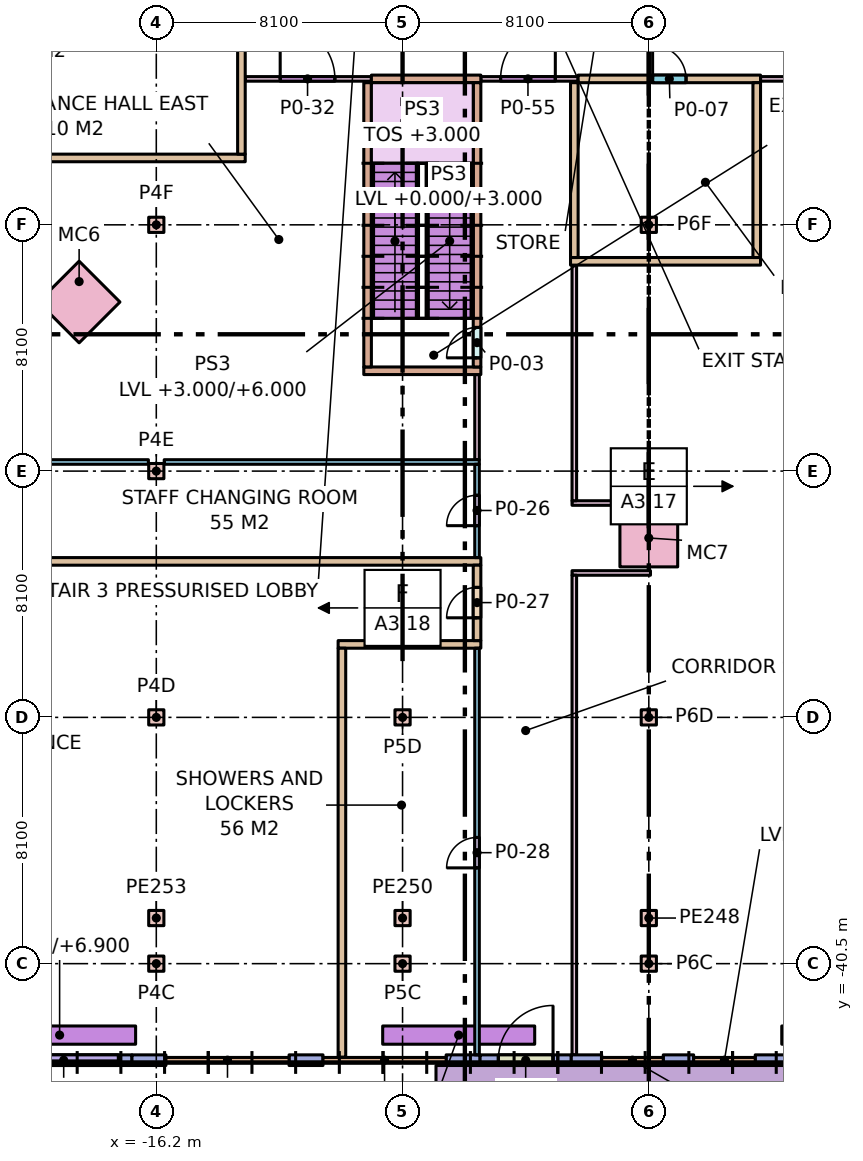
"""IFC4 building model, lengths in metres.
Left out: names, types, materials, properties, quantities, classifications, styles, units other than length and angle.
Written with IfcOpenShell. Run it as: python <this file> out.ifc"""

import sys

from ifc_helpers import new_model, si_unit, direction, frame, frame_2d, origin, origin_2d, place, context, subcontext, project, spatial, rectangle, extrude, element, fill, save


model = new_model("IFC4")
c1 = context("Model", 3, precision=1e-05, world=origin(), true_north=direction((0.0, 1.0)))
c2 = subcontext(c1, "Body", "Model", "MODEL_VIEW")
j1 = project(units=[si_unit("LENGTHUNIT", "METRE"), si_unit("PLANEANGLEUNIT", "RADIAN")], contexts=[c1])
p1 = place(None, origin())
s1 = spatial("IfcSite", under=j1, at=p1, CompositionType="ELEMENT")
p2 = place(p1, origin())
s2 = spatial("IfcBuilding", under=s1, at=p2, CompositionType="ELEMENT")
p3 = place(p2, origin())
s3 = spatial("IfcBuildingStorey", under=s2, at=p3, CompositionType="ELEMENT", Elevation=0.0)
for number, where, z_axis, x_axis in (
    (1, (-16.2, -40.5, 0.0), (0.0, 0.0, 1.0), (1.0, 0.0, 0.0)),
    (2, (-16.2, -32.4, 0.0), (0.0, 0.0, 1.0), (1.0, 0.0, 0.0)),
    (3, (-16.2, -24.3, 0.0), (0.0, 0.0, 1.0), (1.0, 0.0, 0.0)),
    (4, (-16.2, -16.2, 0.0), (0.0, 0.0, 1.0), (1.0, 0.0, 0.0)),
    (5, (-8.1, -40.5, 0.0), (0.0, 0.0, 1.0), (1.0, 0.0, 0.0)),
    (6, (-8.1, -32.4, 0.0), (0.0, 0.0, 1.0), (1.0, 0.0, 0.0)),
    (7, (0.0, -40.5, 0.0), (0.0, 0.0, 1.0), (1.0, 0.0, 0.0)),
    (8, (0.0, -32.4, 0.0), (0.0, 0.0, 1.0), (1.0, 0.0, 0.0)),
    (9, (0.0, -16.2, 0.0), (0.0, 0.0, 1.0), (1.0, 0.0, 0.0)),
    (10, (0.0, -39.0, 0.0), (0.0, 0.0, 1.0), (1.0, 0.0, 0.0)),
    (11, (-8.1, -39.0, 0.0), (0.0, 0.0, 1.0), (1.0, 0.0, 0.0)),
    (12, (-16.2, -39.0, 0.0), (0.0, 0.0, 1.0), (1.0, 0.0, 0.0)),
):
    element("IfcColumn", number, at=place(p3, frame(where, z_axis=z_axis, x_axis=x_axis)), inside=s3, PredefinedType="COLUMN", context=c2, shape_type="SweptSolid", body=[
        extrude(rectangle(XDim=0.5, YDim=0.5, at=origin_2d()), origin(), (0.0, 0.0, 1.0), 6.0),
    ])
for number, where, z_axis, x_axis in (
    (13, (-18.738, -18.738, 0.0), (0.0, 0.0, 1.0), (0.707, -0.707, 0.0)),
    (14, (0.0, -26.5, 0.0), (0.0, 0.0, 1.0), (1.0, 0.0, 0.0)),
):
    element("IfcColumn", number, at=place(p3, frame(where, z_axis=z_axis, x_axis=x_axis)), inside=s3, PredefinedType="COLUMN", context=c2, shape_type="SweptSolid", body=[
        extrude(rectangle(XDim=1.9, YDim=1.9, at=origin_2d()), origin(), (0.0, 0.0, 1.0), 6.0),
    ])
p4 = place(p3, frame((-21.492, -43.675, 0.0), z_axis=(0.0, 0.0, 1.0), x_axis=(1.0, 0.0, 0.0)))
e15 = element("IfcWall", 15, at=p4, inside=s3, PredefinedType="STANDARD", context=c2, shape_type="SweptSolid", body=[
    extrude(rectangle(XDim=4.492, YDim=0.35, at=frame_2d((2.246, 0.0))), origin(), (0.0, 0.0, 1.0), 5.68),
])
p5 = place(p4, frame((0.446, 0.0, 1.0)))
e16 = element("IfcOpeningElement", 16, at=p5, cuts=e15, PredefinedType="OPENING", context=c2, shape_type="SweptSolid", body=[
    extrude(rectangle(XDim=3.6, YDim=4.0, at=frame_2d((1.8, 2.0))), frame((0.0, 0.185, 0.0), z_axis=(0.0, -1.0, 0.0), x_axis=(1.0, 0.0, 0.0)), (0.0, 0.0, 1.0), 0.37),
])
p6 = place(p3, frame((-17.0, -43.675, 0.0), z_axis=(0.0, 0.0, 1.0), x_axis=(1.0, 0.0, 0.0)))
e17 = element("IfcWall", 17, at=p6, inside=s3, PredefinedType="STANDARD", context=c2, shape_type="SweptSolid", body=[
    extrude(rectangle(XDim=1.117, YDim=0.35, at=frame_2d((0.558, 0.0))), origin(), (0.0, 0.0, 1.0), 5.68),
])
p7 = place(p3, frame((-11.833, -43.675, 0.0), z_axis=(0.0, 0.0, 1.0), x_axis=(1.0, 0.0, 0.0)))
e18 = element("IfcWall", 18, at=p7, inside=s3, PredefinedType="STANDARD", context=c2, shape_type="SweptSolid", body=[
    extrude(rectangle(XDim=1.116, YDim=0.35, at=frame_2d((0.558, 0.0))), origin(), (0.0, 0.0, 1.0), 5.68),
])
p8 = place(p3, frame((-6.667, -43.675, 0.0), z_axis=(0.0, 0.0, 1.0), x_axis=(1.0, 0.0, 0.0)))
e19 = element("IfcWall", 19, at=p8, inside=s3, PredefinedType="STANDARD", context=c2, shape_type="SweptSolid", body=[
    extrude(rectangle(XDim=1.117, YDim=0.35, at=frame_2d((0.558, 0.0))), origin(), (0.0, 0.0, 1.0), 5.68),
])
p9 = place(p3, frame((-5.55, -43.675, 0.0), z_axis=(0.0, 0.0, 1.0), x_axis=(1.0, 0.0, 0.0)))
e20 = element("IfcWall", 20, at=p9, inside=s3, PredefinedType="STANDARD", context=c2, shape_type="SweptSolid", body=[
    extrude(rectangle(XDim=3.0, YDim=0.35, at=frame_2d((1.5, 0.0))), origin(), (0.0, 0.0, 1.0), 5.68),
])
p10 = place(p9, frame((0.6, 0.0, 0.0)))
e21 = element("IfcOpeningElement", 21, at=p10, cuts=e20, PredefinedType="OPENING", context=c2, shape_type="SweptSolid", body=[
    extrude(rectangle(XDim=1.8, YDim=2.4, at=frame_2d((0.9, 1.2))), frame((0.0, 0.185, 0.0), z_axis=(0.0, -1.0, 0.0), x_axis=(1.0, 0.0, 0.0)), (0.0, 0.0, 1.0), 0.37),
])
for number, where, z_axis, x_axis in (
    (22, (-2.55, -43.675, 0.0), (0.0, 0.0, 1.0), (1.0, 0.0, 0.0)),
    (23, (0.475, -43.675, 0.0), (0.0, 0.0, 1.0), (1.0, 0.0, 0.0)),
    (24, (3.5, -43.675, 0.0), (0.0, 0.0, 1.0), (1.0, 0.0, 0.0)),
):
    element("IfcWall", number, at=place(p3, frame(where, z_axis=z_axis, x_axis=x_axis)), inside=s3, PredefinedType="STANDARD", context=c2, shape_type="SweptSolid", body=[
        extrude(rectangle(XDim=1.0, YDim=0.35, at=frame_2d((0.5, 0.0))), origin(), (0.0, 0.0, 1.0), 5.68),
    ])
for number, where, z_axis, x_axis in (
    (25, (-21.88, -42.85, 6.0), (0.0, 0.0, 1.0), (1.0, 0.0, 0.0)),
    (26, (-8.753, -42.85, 6.0), (0.0, 0.0, 1.0), (1.0, 0.0, 0.0)),
    (27, (4.373, -42.85, 6.0), (0.0, 0.0, 1.0), (1.0, 0.0, 0.0)),
):
    element("IfcWall", number, at=place(p3, frame(where, z_axis=z_axis, x_axis=x_axis)), inside=s3, PredefinedType="PARAPET", context=c2, shape_type="SweptSolid", body=[
        extrude(rectangle(XDim=5.0, YDim=0.6, at=frame_2d((2.5, 0.0))), origin(), (0.0, 0.0, 1.0), 0.9),
    ])
p11 = place(p3, frame((-24.125, -27.27, 0.0), z_axis=(0.0, 0.0, 1.0), x_axis=(1.0, 0.0, 0.0)))
e28 = element("IfcWall", 28, at=p11, inside=s3, PredefinedType="PARTITIONING", context=c2, shape_type="SweptSolid", body=[
    extrude(rectangle(XDim=18.6, YDim=0.25, at=frame_2d((9.3, 0.0))), origin(), (0.0, 0.0, 1.0), 5.68),
])
p12 = place(p3, frame((-23.875, -24.0, 0.0), z_axis=(0.0, 0.0, 1.0), x_axis=(1.0, 0.0, 0.0)))
e29 = element("IfcWall", 29, at=p12, inside=s3, PredefinedType="PARTITIONING", context=c2, shape_type="SweptSolid", body=[
    extrude(rectangle(XDim=7.415, YDim=0.15, at=frame_2d((3.708, 0.0))), origin(), (0.0, 0.0, 1.0), 5.68),
])
p13 = place(p3, frame((-15.94, -24.0, 0.0), z_axis=(0.0, 0.0, 1.0), x_axis=(1.0, 0.0, 0.0)))
e30 = element("IfcWall", 30, at=p13, inside=s3, PredefinedType="PARTITIONING", context=c2, shape_type="SweptSolid", body=[
    extrude(rectangle(XDim=10.365, YDim=0.15, at=frame_2d((5.183, 0.0))), origin(), (0.0, 0.0, 1.0), 5.68),
])
p14 = place(p3, frame((-5.65, -27.145, 0.0), z_axis=(0.0, 0.0, 1.0), x_axis=(0.0, 1.0, 0.0)))
e31 = element("IfcWall", 31, at=p14, inside=s3, PredefinedType="PARTITIONING", context=c2, shape_type="SweptSolid", body=[
    extrude(rectangle(XDim=3.07, YDim=0.15, at=frame_2d((1.535, 0.0))), origin(), (0.0, 0.0, 1.0), 5.68),
])
p15 = place(p14, frame((1.05, 0.0, 0.0)))
e32 = element("IfcOpeningElement", 32, at=p15, cuts=e31, PredefinedType="OPENING", context=c2, shape_type="SweptSolid", body=[
    extrude(rectangle(XDim=1.0, YDim=2.1, at=frame_2d((0.5, 1.05))), frame((0.0, 0.085, 0.0), z_axis=(0.0, -1.0, 0.0), x_axis=(1.0, 0.0, 0.0)), (0.0, 0.0, 1.0), 0.17),
])
p16 = place(p3, frame((-37.5, -14.0, 0.0), z_axis=(0.0, 0.0, 1.0), x_axis=(1.0, 0.0, 0.0)))
e33 = element("IfcWall", 33, at=p16, inside=s3, PredefinedType="PARTITIONING", context=c2, shape_type="SweptSolid", body=[
    extrude(rectangle(XDim=24.225, YDim=0.25, at=frame_2d((12.113, 0.0))), origin(), (0.0, 0.0, 1.0), 5.68),
])
p17 = place(p3, frame((-10.219, -30.0, 0.0), z_axis=(0.0, 0.0, 1.0), x_axis=(1.0, 0.0, 0.0)))
e34 = element("IfcWall", 34, at=p17, inside=s3, PredefinedType="PARTITIONING", context=c2, shape_type="SweptSolid", body=[
    extrude(rectangle(XDim=4.695, YDim=0.25, at=frame_2d((2.347, 0.0))), origin(), (0.0, 0.0, 1.0), 5.68),
])
p18 = place(p3, frame((-10.094, -43.575, 0.0), z_axis=(0.0, 0.0, 1.0), x_axis=(0.0, 1.0, 0.0)))
e35 = element("IfcWall", 35, at=p18, inside=s3, PredefinedType="PARTITIONING", context=c2, shape_type="SweptSolid", body=[
    extrude(rectangle(XDim=13.45, YDim=0.25, at=frame_2d((6.725, 0.0))), origin(), (0.0, 0.0, 1.0), 5.68),
])
p19 = place(p3, frame((-5.65, -29.875, 0.0), z_axis=(0.0, 0.0, 1.0), x_axis=(0.0, 1.0, 0.0)))
e36 = element("IfcWall", 36, at=p19, inside=s3, PredefinedType="PARTITIONING", context=c2, shape_type="SweptSolid", body=[
    extrude(rectangle(XDim=2.48, YDim=0.25, at=frame_2d((1.24, 0.0))), origin(), (0.0, 0.0, 1.0), 5.68),
])
p20 = place(p19, frame((0.75, 0.0, 0.0)))
e37 = element("IfcOpeningElement", 37, at=p20, cuts=e36, PredefinedType="OPENING", context=c2, shape_type="SweptSolid", body=[
    extrude(rectangle(XDim=1.0, YDim=2.1, at=frame_2d((0.5, 1.05))), frame((0.0, 0.135, 0.0), z_axis=(0.0, -1.0, 0.0), x_axis=(1.0, 0.0, 0.0)), (0.0, 0.0, 1.0), 0.27),
])
p21 = place(p3, frame((-2.325, -11.4, 0.0), z_axis=(0.0, 0.0, 1.0), x_axis=(1.0, 0.0, 0.0)))
e38 = element("IfcWall", 38, at=p21, inside=s3, PredefinedType="PARTITIONING", context=c2, shape_type="SweptSolid", body=[
    extrude(rectangle(XDim=6.0, YDim=0.25, at=frame_2d((3.0, 0.0))), origin(), (0.0, 0.0, 1.0), 5.68),
])
p22 = place(p21, frame((2.45, 0.0, 0.0)))
e39 = element("IfcOpeningElement", 39, at=p22, cuts=e38, PredefinedType="OPENING", context=c2, shape_type="SweptSolid", body=[
    extrude(rectangle(XDim=1.1, YDim=2.1, at=frame_2d((0.55, 1.05))), frame((0.0, 0.135, 0.0), z_axis=(0.0, -1.0, 0.0), x_axis=(1.0, 0.0, 0.0)), (0.0, 0.0, 1.0), 0.27),
])
p23 = place(p3, frame((-2.575, -17.4, 0.0), z_axis=(0.0, 0.0, 1.0), x_axis=(1.0, 0.0, 0.0)))
e40 = element("IfcWall", 40, at=p23, inside=s3, PredefinedType="PARTITIONING", context=c2, shape_type="SweptSolid", body=[
    extrude(rectangle(XDim=6.25, YDim=0.25, at=frame_2d((3.125, 0.0))), origin(), (0.0, 0.0, 1.0), 5.68),
])
for number, where, z_axis, x_axis in (
    (41, (3.55, -17.275, 0.0), (0.0, 0.0, 1.0), (0.0, 1.0, 0.0)),
    (42, (-2.45, -17.275, 0.0), (0.0, 0.0, 1.0), (0.0, 1.0, 0.0)),
):
    element("IfcWall", number, at=place(p3, frame(where, z_axis=z_axis, x_axis=x_axis)), inside=s3, PredefinedType="PARTITIONING", context=c2, shape_type="SweptSolid", body=[
        extrude(rectangle(XDim=5.75, YDim=0.25, at=frame_2d((2.875, 0.0))), origin(), (0.0, 0.0, 1.0), 5.68),
    ])
p24 = place(p3, frame((-9.125, -11.4, 0.0), z_axis=(0.0, 0.0, 1.0), x_axis=(1.0, 0.0, 0.0)))
e43 = element("IfcWall", 43, at=p24, inside=s3, PredefinedType="STANDARD", context=c2, shape_type="SweptSolid", body=[
    extrude(rectangle(XDim=3.6, YDim=0.25, at=frame_2d((1.8, 0.0))), origin(), (0.0, 0.0, 1.0), 5.68),
])
p25 = place(p3, frame((-9.375, -21.0, 0.0), z_axis=(0.0, 0.0, 1.0), x_axis=(1.0, 0.0, 0.0)))
e44 = element("IfcWall", 44, at=p25, inside=s3, PredefinedType="STANDARD", context=c2, shape_type="SweptSolid", body=[
    extrude(rectangle(XDim=3.85, YDim=0.25, at=frame_2d((1.925, 0.0))), origin(), (0.0, 0.0, 1.0), 5.68),
])
p26 = place(p3, frame((-9.25, -20.875, 0.0), z_axis=(0.0, 0.0, 1.0), x_axis=(0.0, 1.0, 0.0)))
e45 = element("IfcWall", 45, at=p26, inside=s3, PredefinedType="STANDARD", context=c2, shape_type="SweptSolid", body=[
    extrude(rectangle(XDim=9.35, YDim=0.25, at=frame_2d((4.675, 0.0))), origin(), (0.0, 0.0, 1.0), 5.68),
])
p27 = place(p3, frame((-5.65, -20.875, 0.0), z_axis=(0.0, 0.0, 1.0), x_axis=(0.0, 1.0, 0.0)))
e46 = element("IfcWall", 46, at=p27, inside=s3, PredefinedType="STANDARD", context=c2, shape_type="SweptSolid", body=[
    extrude(rectangle(XDim=9.35, YDim=0.25, at=frame_2d((4.675, 0.0))), origin(), (0.0, 0.0, 1.0), 5.68),
])
p28 = place(p27, frame((0.3, 0.0, 0.0)))
e47 = element("IfcOpeningElement", 47, at=p28, cuts=e46, PredefinedType="OPENING", context=c2, shape_type="SweptSolid", body=[
    extrude(rectangle(XDim=1.0, YDim=2.1, at=frame_2d((0.5, 1.05))), frame((0.0, 0.135, 0.0), z_axis=(0.0, -1.0, 0.0), x_axis=(1.0, 0.0, 0.0)), (0.0, 0.0, 1.0), 0.27),
])
p29 = place(p3, frame((-13.4, -13.875, 0.0), z_axis=(0.0, 0.0, 1.0), x_axis=(0.0, 1.0, 0.0)))
e48 = element("IfcWall", 48, at=p29, inside=s3, PredefinedType="PARTITIONING", context=c2, shape_type="SweptSolid", body=[
    extrude(rectangle(XDim=8.1, YDim=0.25, at=frame_2d((4.05, 0.0))), origin(), (0.0, 0.0, 1.0), 5.68),
])
p30 = place(p3, frame((-13.275, -11.4, 0.0), z_axis=(0.0, 0.0, 1.0), x_axis=(1.0, 0.0, 0.0)))
e49 = element("IfcWall", 49, at=p30, inside=s3, PredefinedType="PARTITIONING", context=c2, shape_type="SweptSolid", body=[
    extrude(rectangle(XDim=4.15, YDim=0.15, at=frame_2d((2.075, 0.0))), origin(), (0.0, 0.0, 1.0), 5.68),
])
p31 = place(p30, frame((1.15, 0.0, 0.0)))
e50 = element("IfcOpeningElement", 50, at=p31, cuts=e49, PredefinedType="OPENING", context=c2, shape_type="SweptSolid", body=[
    extrude(rectangle(XDim=1.8, YDim=2.4, at=frame_2d((0.9, 1.2))), frame((0.0, 0.085, 0.0), z_axis=(0.0, -1.0, 0.0), x_axis=(1.0, 0.0, 0.0)), (0.0, 0.0, 1.0), 0.17),
])
p32 = place(p3, frame((3.675, -11.4, 0.0), z_axis=(0.0, 0.0, 1.0), x_axis=(1.0, 0.0, 0.0)))
e51 = element("IfcWall", 51, at=p32, inside=s3, PredefinedType="PARTITIONING", context=c2, shape_type="SweptSolid", body=[
    extrude(rectangle(XDim=9.85, YDim=0.15, at=frame_2d((4.925, 0.0))), origin(), (0.0, 0.0, 1.0), 5.68),
])
p33 = place(p3, frame((-5.525, -11.4, 0.0), z_axis=(0.0, 0.0, 1.0), x_axis=(1.0, 0.0, 0.0)))
e52 = element("IfcWall", 52, at=p33, inside=s3, PredefinedType="PARTITIONING", context=c2, shape_type="SweptSolid", body=[
    extrude(rectangle(XDim=3.2, YDim=0.15, at=frame_2d((1.6, 0.0))), origin(), (0.0, 0.0, 1.0), 5.68),
])
p34 = place(p33, frame((0.65, 0.0, 0.0)))
e53 = element("IfcOpeningElement", 53, at=p34, cuts=e52, PredefinedType="OPENING", context=c2, shape_type="SweptSolid", body=[
    extrude(rectangle(XDim=1.8, YDim=2.4, at=frame_2d((0.9, 1.2))), frame((0.0, 0.085, 0.0), z_axis=(0.0, -1.0, 0.0), x_axis=(1.0, 0.0, 0.0)), (0.0, 0.0, 1.0), 0.17),
])
p35 = place(p3, frame((-5.65, -23.925, 0.0), z_axis=(0.0, 0.0, 1.0), x_axis=(0.0, 1.0, 0.0)))
e54 = element("IfcWall", 54, at=p35, inside=s3, PredefinedType="PARTITIONING", context=c2, shape_type="SweptSolid", body=[
    extrude(rectangle(XDim=2.8, YDim=0.15, at=frame_2d((1.4, 0.0))), origin(), (0.0, 0.0, 1.0), 5.68),
])
for number, where, z_axis, x_axis in (
    (55, (-2.525, -27.65, 0.0), (0.0, 0.0, 1.0), (1.0, 0.0, 0.0)),
    (56, (-2.525, -25.35, 0.0), (0.0, 0.0, 1.0), (1.0, 0.0, 0.0)),
):
    element("IfcWall", number, at=place(p3, frame(where, z_axis=z_axis, x_axis=x_axis)), inside=s3, PredefinedType="PARTITIONING", context=c2, shape_type="SweptSolid", body=[
        extrude(rectangle(XDim=2.58, YDim=0.15, at=frame_2d((1.29, 0.0))), origin(), (0.0, 0.0, 1.0), 5.68),
    ])
p36 = place(p3, frame((-2.45, -43.5, 0.0), z_axis=(0.0, 0.0, 1.0), x_axis=(0.0, 1.0, 0.0)))
e57 = element("IfcWall", 57, at=p36, inside=s3, PredefinedType="PARTITIONING", context=c2, shape_type="SweptSolid", body=[
    extrude(rectangle(XDim=15.775, YDim=0.15, at=frame_2d((7.887, 0.0))), origin(), (0.0, 0.0, 1.0), 5.68),
])
p37 = place(p3, frame((-2.45, -25.275, 0.0), z_axis=(0.0, 0.0, 1.0), x_axis=(0.0, 1.0, 0.0)))
e58 = element("IfcWall", 58, at=p37, inside=s3, PredefinedType="PARTITIONING", context=c2, shape_type="SweptSolid", body=[
    extrude(rectangle(XDim=7.75, YDim=0.15, at=frame_2d((3.875, 0.0))), origin(), (0.0, 0.0, 1.0), 5.68),
])
p38 = place(p3, frame((-5.65, -43.5, 0.0), z_axis=(0.0, 0.0, 1.0), x_axis=(0.0, 1.0, 0.0)))
e59 = element("IfcWall", 59, at=p38, inside=s3, PredefinedType="PARTITIONING", context=c2, shape_type="SweptSolid", body=[
    extrude(rectangle(XDim=13.375, YDim=0.15, at=frame_2d((6.688, 0.0))), origin(), (0.0, 0.0, 1.0), 5.68),
])
p39 = place(p38, frame((6.15, 0.0, 0.0)))
e60 = element("IfcOpeningElement", 60, at=p39, cuts=e59, PredefinedType="OPENING", context=c2, shape_type="SweptSolid", body=[
    extrude(rectangle(XDim=1.0, YDim=2.1, at=frame_2d((0.5, 1.05))), frame((0.0, 0.085, 0.0), z_axis=(0.0, -1.0, 0.0), x_axis=(1.0, 0.0, 0.0)), (0.0, 0.0, 1.0), 0.17),
])
p40 = place(p5, origin())
e61 = element("IfcWindow", 61, at=p40, inside=s3, PartitioningType="SINGLE_PANEL", PredefinedType="WINDOW", context=c2, shape_type="SweptSolid", body=[
    extrude(rectangle(XDim=3.6, YDim=4.0, at=frame_2d((1.8, 2.0))), frame((0.0, 0.03, 0.0), z_axis=(0.0, -1.0, 0.0), x_axis=(1.0, 0.0, 0.0)), (0.0, 0.0, 1.0), 0.06),
])
fill(e16, e61)
p41 = place(p28, origin())
e62 = element("IfcDoor", 62, at=p41, inside=s3, OperationType="SINGLE_SWING_LEFT", PredefinedType="DOOR", context=c2, shape_type="SweptSolid", body=[
    extrude(rectangle(XDim=1.0, YDim=2.1, at=frame_2d((0.5, 1.05))), frame((0.0, 0.025, 0.0), z_axis=(0.0, -1.0, 0.0), x_axis=(1.0, 0.0, 0.0)), (0.0, 0.0, 1.0), 0.05),
])
fill(e47, e62)
p42 = place(p22, origin())
e63 = element("IfcDoor", 63, at=p42, inside=s3, OperationType="SINGLE_SWING_LEFT", PredefinedType="DOOR", context=c2, shape_type="SweptSolid", body=[
    extrude(rectangle(XDim=1.1, YDim=2.1, at=frame_2d((0.55, 1.05))), frame((0.0, 0.025, 0.0), z_axis=(0.0, -1.0, 0.0), x_axis=(1.0, 0.0, 0.0)), (0.0, 0.0, 1.0), 0.05),
])
fill(e39, e63)
p43 = place(p15, origin())
e64 = element("IfcDoor", 64, at=p43, inside=s3, OperationType="SINGLE_SWING_LEFT", PredefinedType="DOOR", context=c2, shape_type="SweptSolid", body=[
    extrude(rectangle(XDim=1.0, YDim=2.1, at=frame_2d((0.5, 1.05))), frame((0.0, 0.025, 0.0), z_axis=(0.0, -1.0, 0.0), x_axis=(1.0, 0.0, 0.0)), (0.0, 0.0, 1.0), 0.05),
])
fill(e32, e64)
p44 = place(p20, origin())
e65 = element("IfcDoor", 65, at=p44, inside=s3, OperationType="SINGLE_SWING_LEFT", PredefinedType="DOOR", context=c2, shape_type="SweptSolid", body=[
    extrude(rectangle(XDim=1.0, YDim=2.1, at=frame_2d((0.5, 1.05))), frame((0.0, 0.025, 0.0), z_axis=(0.0, -1.0, 0.0), x_axis=(1.0, 0.0, 0.0)), (0.0, 0.0, 1.0), 0.05),
])
fill(e37, e65)
p45 = place(p39, origin())
e66 = element("IfcDoor", 66, at=p45, inside=s3, OperationType="SINGLE_SWING_LEFT", PredefinedType="DOOR", context=c2, shape_type="SweptSolid", body=[
    extrude(rectangle(XDim=1.0, YDim=2.1, at=frame_2d((0.5, 1.05))), frame((0.0, 0.025, 0.0), z_axis=(0.0, -1.0, 0.0), x_axis=(1.0, 0.0, 0.0)), (0.0, 0.0, 1.0), 0.05),
])
fill(e60, e66)
p46 = place(p31, origin())
e67 = element("IfcDoor", 67, at=p46, inside=s3, OperationType="SINGLE_SWING_LEFT", PredefinedType="DOOR", context=c2, shape_type="SweptSolid", body=[
    extrude(rectangle(XDim=1.8, YDim=2.4, at=frame_2d((0.9, 1.2))), frame((0.0, 0.025, 0.0), z_axis=(0.0, -1.0, 0.0), x_axis=(1.0, 0.0, 0.0)), (0.0, 0.0, 1.0), 0.05),
])
fill(e50, e67)
p47 = place(p10, frame((1.8, 0.0, 0.0), z_axis=(0.0, 0.0, 1.0), x_axis=(-1.0, 0.0, 0.0)))
e68 = element("IfcDoor", 68, at=p47, inside=s3, OperationType="SINGLE_SWING_RIGHT", PredefinedType="DOOR", context=c2, shape_type="SweptSolid", body=[
    extrude(rectangle(XDim=1.8, YDim=2.4, at=frame_2d((0.9, 1.2))), frame((0.0, 0.025, 0.0), z_axis=(0.0, -1.0, 0.0), x_axis=(1.0, 0.0, 0.0)), (0.0, 0.0, 1.0), 0.05),
])
fill(e21, e68)
p48 = place(p34, frame((1.8, 0.0, 0.0), z_axis=(0.0, 0.0, 1.0), x_axis=(-1.0, 0.0, 0.0)))
e69 = element("IfcDoor", 69, at=p48, inside=s3, OperationType="SINGLE_SWING_RIGHT", PredefinedType="DOOR", context=c2, shape_type="SweptSolid", body=[
    extrude(rectangle(XDim=1.8, YDim=2.4, at=frame_2d((0.9, 1.2))), frame((0.0, 0.025, 0.0), z_axis=(0.0, -1.0, 0.0), x_axis=(1.0, 0.0, 0.0)), (0.0, 0.0, 1.0), 0.05),
])
fill(e53, e69)
save(model, sys.argv[1])
